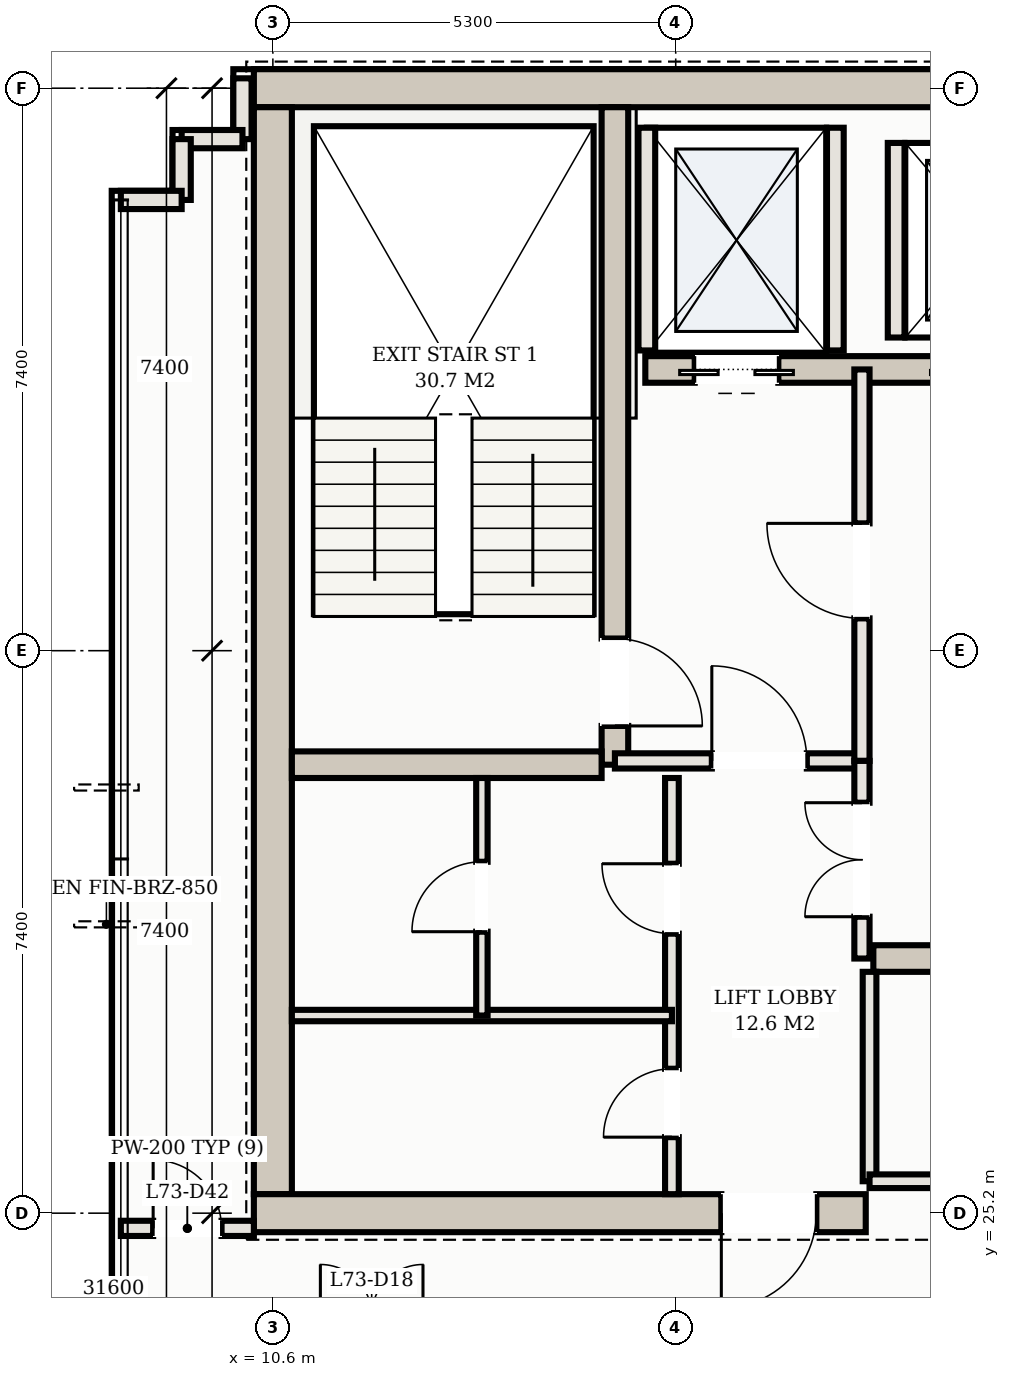
"""IFC4 building model, lengths in metres.
Left out: names, types, materials, properties, quantities, classifications, styles, units other than length and angle.
Written with IfcOpenShell. Run it as: python <this file> out.ifc"""

import sys

from ifc_helpers import new_model, si_unit, direction, frame, frame_2d, origin, place, context, subcontext, project, spatial, rectangle, extrude, element, fill, save


model = new_model("IFC4")
c1 = context("Model", 3, precision=1e-05, world=origin(), true_north=direction((0.0, 1.0)))
c2 = subcontext(c1, "Body", "Model", "MODEL_VIEW")
j1 = project(units=[si_unit("LENGTHUNIT", "METRE"), si_unit("PLANEANGLEUNIT", "RADIAN")], contexts=[c1])
p1 = place(None, origin())
s1 = spatial("IfcSite", under=j1, at=p1, CompositionType="ELEMENT")
p2 = place(p1, origin())
s2 = spatial("IfcBuilding", under=s1, at=p2, CompositionType="ELEMENT")
p3 = place(p2, frame((0.0, 0.0, 262.7)))
s3 = spatial("IfcBuildingStorey", under=s2, at=p3, CompositionType="ELEMENT", Elevation=262.7)
p4 = place(p3, frame((10.35, 40.0, 0.0), z_axis=(0.0, 0.0, 1.0), x_axis=(1.0, 0.0, 0.0)))
e1 = element("IfcWall", 1, at=p4, inside=s3, PredefinedType="SHEAR", context=c2, shape_type="SweptSolid", body=[
    extrude(rectangle(XDim=32.3, YDim=0.5, at=frame_2d((16.15, 0.0))), origin(), (0.0, 0.0, 1.0), 3.04),
])
p5 = place(p3, frame((10.6, 25.45, 0.0), z_axis=(0.0, 0.0, 1.0), x_axis=(0.0, 1.0, 0.0)))
e2 = element("IfcWall", 2, at=p5, inside=s3, PredefinedType="SHEAR", context=c2, shape_type="SweptSolid", body=[
    extrude(rectangle(XDim=14.3, YDim=0.5, at=frame_2d((7.15, 0.0))), origin(), (0.0, 0.0, 1.0), 3.04),
])
p6 = place(p3, frame((10.35, 25.2, 0.0), z_axis=(0.0, 0.0, 1.0), x_axis=(1.0, 0.0, 0.0)))
e3 = element("IfcWall", 3, at=p6, inside=s3, PredefinedType="SHEAR", context=c2, shape_type="SweptSolid", body=[
    extrude(rectangle(XDim=8.05, YDim=0.5, at=frame_2d((4.025, 0.0))), origin(), (0.0, 0.0, 1.0), 3.04),
])
p7 = place(p6, frame((6.15, 0.0, 0.0)))
e4 = element("IfcOpeningElement", 4, at=p7, cuts=e3, PredefinedType="OPENING", context=c2, shape_type="SweptSolid", body=[
    extrude(rectangle(XDim=1.25, YDim=2.2, at=frame_2d((0.625, 1.1))), frame((0.0, 0.26, 0.0), z_axis=(0.0, -1.0, 0.0), x_axis=(1.0, 0.0, 0.0)), (0.0, 0.0, 1.0), 0.52),
])
p8 = place(p3, frame((15.1, 31.1, 0.0), z_axis=(0.0, 0.0, 1.0), x_axis=(0.0, 1.0, 0.0)))
e5 = element("IfcWall", 5, at=p8, inside=s3, PredefinedType="SHEAR", context=c2, shape_type="SweptSolid", body=[
    extrude(rectangle(XDim=8.65, YDim=0.35, at=frame_2d((4.325, 0.0))), origin(), (0.0, 0.0, 1.0), 3.04),
])
p9 = place(p8, frame((0.51, 0.0, 0.0)))
e6 = element("IfcOpeningElement", 6, at=p9, cuts=e5, PredefinedType="OPENING", context=c2, shape_type="SweptSolid", body=[
    extrude(rectangle(XDim=1.15, YDim=2.2, at=frame_2d((0.575, 1.1))), frame((0.0, 0.185, 0.0), z_axis=(0.0, -1.0, 0.0), x_axis=(1.0, 0.0, 0.0)), (0.0, 0.0, 1.0), 0.37),
])
p10 = place(p3, frame((10.85, 31.1, 0.0), z_axis=(0.0, 0.0, 1.0), x_axis=(1.0, 0.0, 0.0)))
e7 = element("IfcWall", 7, at=p10, inside=s3, PredefinedType="SHEAR", context=c2, shape_type="SweptSolid", body=[
    extrude(rectangle(XDim=4.075, YDim=0.35, at=frame_2d((2.038, 0.0))), origin(), (0.0, 0.0, 1.0), 3.04),
])
p11 = place(p3, frame((15.5, 36.3, 0.0), z_axis=(0.0, 0.0, 1.0), x_axis=(1.0, 0.0, 0.0)))
e8 = element("IfcWall", 8, at=p11, inside=s3, PredefinedType="SHEAR", context=c2, shape_type="SweptSolid", body=[
    extrude(rectangle(XDim=22.0, YDim=0.35, at=frame_2d((11.0, 0.0))), origin(), (0.0, 0.0, 1.0), 3.04),
])
p12 = place(p11, frame((0.65, 0.0, 0.0)))
e9 = element("IfcOpeningElement", 9, at=p12, cuts=e8, PredefinedType="OPENING", context=c2, shape_type="SweptSolid", body=[
    extrude(rectangle(XDim=1.1, YDim=2.15, at=frame_2d((0.55, 1.075))), frame((0.0, 0.185, 0.0), z_axis=(0.0, -1.0, 0.0), x_axis=(1.0, 0.0, 0.0)), (0.0, 0.0, 1.0), 0.37),
])
p13 = place(p11, frame((20.25, 0.0, 0.0)))
e10 = element("IfcOpeningElement", 10, at=p13, cuts=e8, PredefinedType="OPENING", context=c2, shape_type="SweptSolid", body=[
    extrude(rectangle(XDim=1.1, YDim=2.15, at=frame_2d((0.55, 1.075))), frame((0.0, 0.185, 0.0), z_axis=(0.0, -1.0, 0.0), x_axis=(1.0, 0.0, 0.0)), (0.0, 0.0, 1.0), 0.37),
])
p14 = place(p11, frame((17.05, 0.0, 0.0)))
e11 = element("IfcOpeningElement", 11, at=p14, cuts=e8, PredefinedType="OPENING", context=c2, shape_type="SweptSolid", body=[
    extrude(rectangle(XDim=1.3, YDim=2.2, at=frame_2d((0.65, 1.1))), frame((0.0, 0.185, 0.0), z_axis=(0.0, -1.0, 0.0), x_axis=(1.0, 0.0, 0.0)), (0.0, 0.0, 1.0), 0.37),
])
p15 = place(p11, frame((3.95, 0.0, 0.0)))
e12 = element("IfcOpeningElement", 12, at=p15, cuts=e8, PredefinedType="OPENING", context=c2, shape_type="SweptSolid", body=[
    extrude(rectangle(XDim=1.1, YDim=2.15, at=frame_2d((0.55, 1.075))), frame((0.0, 0.185, 0.0), z_axis=(0.0, -1.0, 0.0), x_axis=(1.0, 0.0, 0.0)), (0.0, 0.0, 1.0), 0.37),
])
p16 = place(p11, frame((6.55, 0.0, 0.0)))
e13 = element("IfcOpeningElement", 13, at=p16, cuts=e8, PredefinedType="OPENING", context=c2, shape_type="SweptSolid", body=[
    extrude(rectangle(XDim=1.1, YDim=2.15, at=frame_2d((0.55, 1.075))), frame((0.0, 0.185, 0.0), z_axis=(0.0, -1.0, 0.0), x_axis=(1.0, 0.0, 0.0)), (0.0, 0.0, 1.0), 0.37),
])
p17 = place(p11, frame((9.15, 0.0, 0.0)))
e14 = element("IfcOpeningElement", 14, at=p17, cuts=e8, PredefinedType="OPENING", context=c2, shape_type="SweptSolid", body=[
    extrude(rectangle(XDim=1.1, YDim=2.15, at=frame_2d((0.55, 1.075))), frame((0.0, 0.185, 0.0), z_axis=(0.0, -1.0, 0.0), x_axis=(1.0, 0.0, 0.0)), (0.0, 0.0, 1.0), 0.37),
])
p18 = place(p3, frame((18.5, 28.55, 0.0), z_axis=(0.0, 0.0, 1.0), x_axis=(1.0, 0.0, 0.0)))
e15 = element("IfcWall", 15, at=p18, inside=s3, PredefinedType="SHEAR", context=c2, shape_type="SweptSolid", body=[
    extrude(rectangle(XDim=16.0, YDim=0.35, at=frame_2d((8.0, 0.0))), origin(), (0.0, 0.0, 1.0), 3.04),
])
for number, where, z_axis, x_axis in (
    (16, (15.52, 36.55, 0.0), (0.0, 0.0, 1.0), (0.0, 1.0, 0.0)),
    (17, (18.0, 36.55, 0.0), (0.0, 0.0, 1.0), (0.0, 1.0, 0.0)),
):
    element("IfcWall", number, at=place(p3, frame(where, z_axis=z_axis, x_axis=x_axis)), inside=s3, PredefinedType="SOLIDWALL", context=c2, shape_type="SweptSolid", body=[
        extrude(rectangle(XDim=2.93, YDim=0.22, at=frame_2d((1.465, 0.0))), origin(), (0.0, 0.0, 1.0), 3.04),
    ])
p19 = place(p3, frame((18.8, 36.72, 0.0), z_axis=(0.0, 0.0, 1.0), x_axis=(0.0, 1.0, 0.0)))
e18 = element("IfcWall", 18, at=p19, inside=s3, PredefinedType="SOLIDWALL", context=c2, shape_type="SweptSolid", body=[
    extrude(rectangle(XDim=2.56, YDim=0.22, at=frame_2d((1.28, 0.0))), origin(), (0.0, 0.0, 1.0), 3.04),
])
p20 = place(p3, frame((10.2, 40.13, 0.0), z_axis=(0.0, 0.0, 1.0), x_axis=(0.0, -1.0, 0.0)))
e19 = element("IfcWall", 19, at=p20, inside=s3, PredefinedType="SOLIDWALL", context=c2, shape_type="SweptSolid", body=[
    extrude(rectangle(XDim=0.8, YDim=0.24, at=frame_2d((0.4, 0.0))), origin(), (0.0, 0.0, 1.0), 3.04),
])
for number, where, z_axis, x_axis in (
    (20, (10.2, 39.33, 0.0), (0.0, 0.0, 1.0), (-1.0, 0.0, 0.0)),
    (21, (9.4, 39.33, 0.0), (0.0, 0.0, 1.0), (0.0, -1.0, 0.0)),
):
    element("IfcWall", number, at=place(p3, frame(where, z_axis=z_axis, x_axis=x_axis)), inside=s3, PredefinedType="SOLIDWALL", context=c2, shape_type="SweptSolid", body=[
        extrude(rectangle(XDim=0.8, YDim=0.24, at=frame_2d((0.4, 0.0))), origin(), (0.0, 0.0, 1.0), 3.04),
    ])
p21 = place(p3, frame((9.4, 38.53, 0.0), z_axis=(0.0, 0.0, 1.0), x_axis=(-1.0, 0.0, 0.0)))
e22 = element("IfcWall", 22, at=p21, inside=s3, PredefinedType="SOLIDWALL", context=c2, shape_type="SweptSolid", body=[
    extrude(rectangle(XDim=0.8, YDim=0.24, at=frame_2d((0.4, 0.0))), origin(), (0.0, 0.0, 1.0), 3.04),
])
p22 = place(p3, frame((15.1, 31.15, 0.0), z_axis=(0.0, 0.0, 1.0), x_axis=(1.0, 0.0, 0.0)))
e23 = element("IfcWall", 23, at=p22, inside=s3, PredefinedType="PARTITIONING", context=c2, shape_type="SweptSolid", body=[
    extrude(rectangle(XDim=3.25, YDim=0.2, at=frame_2d((1.625, 0.0))), origin(), (0.0, 0.0, 1.0), 2.38),
])
p23 = place(p22, frame((1.275, 0.0, 0.0)))
e24 = element("IfcOpeningElement", 24, at=p23, cuts=e23, PredefinedType="OPENING", context=c2, shape_type="SweptSolid", body=[
    extrude(rectangle(XDim=1.25, YDim=2.2, at=frame_2d((0.625, 1.1))), frame((0.0, 0.11, 0.0), z_axis=(0.0, -1.0, 0.0), x_axis=(1.0, 0.0, 0.0)), (0.0, 0.0, 1.0), 0.22),
])
p24 = place(p3, frame((18.35, 31.15, 0.0), z_axis=(0.0, 0.0, 1.0), x_axis=(0.0, 1.0, 0.0)))
e25 = element("IfcWall", 25, at=p24, inside=s3, PredefinedType="PARTITIONING", context=c2, shape_type="SweptSolid", body=[
    extrude(rectangle(XDim=5.15, YDim=0.2, at=frame_2d((2.575, 0.0))), origin(), (0.0, 0.0, 1.0), 2.38),
])
p25 = place(p24, frame((1.875, 0.0, 0.0)))
e26 = element("IfcOpeningElement", 26, at=p25, cuts=e25, PredefinedType="OPENING", context=c2, shape_type="SweptSolid", body=[
    extrude(rectangle(XDim=1.25, YDim=2.2, at=frame_2d((0.625, 1.1))), frame((0.0, 0.11, 0.0), z_axis=(0.0, -1.0, 0.0), x_axis=(1.0, 0.0, 0.0)), (0.0, 0.0, 1.0), 0.22),
])
p26 = place(p3, frame((15.85, 25.45, 0.0), z_axis=(0.0, 0.0, 1.0), x_axis=(0.0, 1.0, 0.0)))
e27 = element("IfcWall", 27, at=p26, inside=s3, PredefinedType="PARTITIONING", context=c2, shape_type="SweptSolid", body=[
    extrude(rectangle(XDim=5.475, YDim=0.18, at=frame_2d((2.738, 0.0))), origin(), (0.0, 0.0, 1.0), 2.38),
])
p27 = place(p26, frame((0.75, 0.0, 0.0)))
e28 = element("IfcOpeningElement", 28, at=p27, cuts=e27, PredefinedType="OPENING", context=c2, shape_type="SweptSolid", body=[
    extrude(rectangle(XDim=0.9, YDim=2.15, at=frame_2d((0.45, 1.075))), frame((0.0, 0.1, 0.0), z_axis=(0.0, -1.0, 0.0), x_axis=(1.0, 0.0, 0.0)), (0.0, 0.0, 1.0), 0.2),
])
p28 = place(p26, frame((3.427, 0.0, 0.0)))
e29 = element("IfcOpeningElement", 29, at=p28, cuts=e27, PredefinedType="OPENING", context=c2, shape_type="SweptSolid", body=[
    extrude(rectangle(XDim=0.92, YDim=2.15, at=frame_2d((0.46, 1.075))), frame((0.0, 0.1, 0.0), z_axis=(0.0, -1.0, 0.0), x_axis=(1.0, 0.0, 0.0)), (0.0, 0.0, 1.0), 0.2),
])
p29 = place(p3, frame((10.85, 27.8, 0.0), z_axis=(0.0, 0.0, 1.0), x_axis=(1.0, 0.0, 0.0)))
e30 = element("IfcWall", 30, at=p29, inside=s3, PredefinedType="PARTITIONING", context=c2, shape_type="SweptSolid", body=[
    extrude(rectangle(XDim=5.0, YDim=0.15, at=frame_2d((2.5, 0.0))), origin(), (0.0, 0.0, 1.0), 2.38),
])
p30 = place(p3, frame((13.35, 27.8, 0.0), z_axis=(0.0, 0.0, 1.0), x_axis=(0.0, 1.0, 0.0)))
e31 = element("IfcWall", 31, at=p30, inside=s3, PredefinedType="PARTITIONING", context=c2, shape_type="SweptSolid", body=[
    extrude(rectangle(XDim=3.125, YDim=0.15, at=frame_2d((1.562, 0.0))), origin(), (0.0, 0.0, 1.0), 2.38),
])
p31 = place(p30, frame((1.103, 0.0, 0.0)))
e32 = element("IfcOpeningElement", 32, at=p31, cuts=e31, PredefinedType="OPENING", context=c2, shape_type="SweptSolid", body=[
    extrude(rectangle(XDim=0.92, YDim=2.15, at=frame_2d((0.46, 1.075))), frame((0.0, 0.085, 0.0), z_axis=(0.0, -1.0, 0.0), x_axis=(1.0, 0.0, 0.0)), (0.0, 0.0, 1.0), 0.17),
])
p32 = place(p3, frame((18.35, 28.55, 0.0), z_axis=(0.0, 0.0, 1.0), x_axis=(0.0, 1.0, 0.0)))
e33 = element("IfcWall", 33, at=p32, inside=s3, PredefinedType="PARTITIONING", context=c2, shape_type="SweptSolid", body=[
    extrude(rectangle(XDim=2.6, YDim=0.2, at=frame_2d((1.3, 0.0))), origin(), (0.0, 0.0, 1.0), 2.38),
])
p33 = place(p32, frame((0.55, 0.0, 0.0)))
e34 = element("IfcOpeningElement", 34, at=p33, cuts=e33, PredefinedType="OPENING", context=c2, shape_type="SweptSolid", body=[
    extrude(rectangle(XDim=1.5, YDim=2.25, at=frame_2d((0.75, 1.125))), frame((0.0, 0.11, 0.0), z_axis=(0.0, -1.0, 0.0), x_axis=(1.0, 0.0, 0.0)), (0.0, 0.0, 1.0), 0.22),
])
p34 = place(p3, frame((18.45, 25.62, 0.0), z_axis=(0.0, 0.0, 1.0), x_axis=(0.0, 1.0, 0.0)))
e35 = element("IfcWall", 35, at=p34, inside=s3, PredefinedType="PARTITIONING", context=c2, shape_type="SweptSolid", body=[
    extrude(rectangle(XDim=2.755, YDim=0.18, at=frame_2d((1.377, 0.0))), origin(), (0.0, 0.0, 1.0), 2.38),
])
p35 = place(p3, frame((18.45, 25.62, 0.0), z_axis=(0.0, 0.0, 1.0), x_axis=(1.0, 0.0, 0.0)))
e36 = element("IfcWall", 36, at=p35, inside=s3, PredefinedType="PARTITIONING", context=c2, shape_type="SweptSolid", body=[
    extrude(rectangle(XDim=7.9, YDim=0.18, at=frame_2d((3.95, 0.0))), origin(), (0.0, 0.0, 1.0), 2.38),
])
p36 = place(p35, frame((3.34, 0.0, 0.0)))
e37 = element("IfcOpeningElement", 37, at=p36, cuts=e36, PredefinedType="OPENING", context=c2, shape_type="SweptSolid", body=[
    extrude(rectangle(XDim=0.92, YDim=2.15, at=frame_2d((0.46, 1.075))), frame((0.0, 0.1, 0.0), z_axis=(0.0, -1.0, 0.0), x_axis=(1.0, 0.0, 0.0)), (0.0, 0.0, 1.0), 0.2),
])
p37 = place(p3, frame((8.6, 25.0, 0.0), z_axis=(0.0, 0.0, 1.0), x_axis=(1.0, 0.0, 0.0)))
e38 = element("IfcWall", 38, at=p37, inside=s3, PredefinedType="PARTITIONING", context=c2, shape_type="SweptSolid", body=[
    extrude(rectangle(XDim=1.75, YDim=0.2, at=frame_2d((0.875, 0.0))), origin(), (0.0, 0.0, 1.0), 2.38),
])
p38 = place(p37, frame((0.425, 0.0, 0.0)))
e39 = element("IfcOpeningElement", 39, at=p38, cuts=e38, PredefinedType="OPENING", context=c2, shape_type="SweptSolid", body=[
    extrude(rectangle(XDim=0.9, YDim=2.15, at=frame_2d((0.45, 1.075))), frame((0.0, 0.11, 0.0), z_axis=(0.0, -1.0, 0.0), x_axis=(1.0, 0.0, 0.0)), (0.0, 0.0, 1.0), 0.22),
])
p39 = place(p12, frame((1.1, 0.0, 0.0), z_axis=(0.0, 0.0, 1.0), x_axis=(-1.0, 0.0, 0.0)))
e40 = element("IfcDoor", 40, at=p39, inside=s3, OperationType="DOUBLE_DOOR_SLIDING", PredefinedType="DOOR", context=c2, shape_type="SweptSolid", body=[
    extrude(rectangle(XDim=1.1, YDim=2.15, at=frame_2d((0.55, 1.075))), frame((0.0, 0.025, 0.0), z_axis=(0.0, -1.0, 0.0), x_axis=(1.0, 0.0, 0.0)), (0.0, 0.0, 1.0), 0.05),
])
fill(e9, e40)
p40 = place(p7, frame((1.25, 0.0, 0.0), z_axis=(0.0, 0.0, 1.0), x_axis=(-1.0, 0.0, 0.0)))
e41 = element("IfcDoor", 41, at=p40, inside=s3, OperationType="SINGLE_SWING_RIGHT", PredefinedType="DOOR", context=c2, shape_type="SweptSolid", body=[
    extrude(rectangle(XDim=1.25, YDim=2.2, at=frame_2d((0.625, 1.1))), frame((0.0, 0.025, 0.0), z_axis=(0.0, -1.0, 0.0), x_axis=(1.0, 0.0, 0.0)), (0.0, 0.0, 1.0), 0.05),
])
fill(e4, e41)
p41 = place(p23, origin())
e42 = element("IfcDoor", 42, at=p41, inside=s3, OperationType="SINGLE_SWING_LEFT", PredefinedType="DOOR", context=c2, shape_type="SweptSolid", body=[
    extrude(rectangle(XDim=1.25, YDim=2.2, at=frame_2d((0.625, 1.1))), frame((0.0, 0.025, 0.0), z_axis=(0.0, -1.0, 0.0), x_axis=(1.0, 0.0, 0.0)), (0.0, 0.0, 1.0), 0.05),
])
fill(e24, e42)
p42 = place(p25, origin())
e43 = element("IfcDoor", 43, at=p42, inside=s3, OperationType="SINGLE_SWING_RIGHT", PredefinedType="DOOR", context=c2, shape_type="SweptSolid", body=[
    extrude(rectangle(XDim=1.25, YDim=2.2, at=frame_2d((0.625, 1.1))), frame((0.0, 0.025, 0.0), z_axis=(0.0, -1.0, 0.0), x_axis=(1.0, 0.0, 0.0)), (0.0, 0.0, 1.0), 0.05),
])
fill(e26, e43)
p43 = place(p9, frame((1.15, 0.0, 0.0), z_axis=(0.0, 0.0, 1.0), x_axis=(-1.0, 0.0, 0.0)))
e44 = element("IfcDoor", 44, at=p43, inside=s3, OperationType="SINGLE_SWING_RIGHT", PredefinedType="DOOR", context=c2, shape_type="SweptSolid", body=[
    extrude(rectangle(XDim=1.15, YDim=2.2, at=frame_2d((0.575, 1.1))), frame((0.0, 0.025, 0.0), z_axis=(0.0, -1.0, 0.0), x_axis=(1.0, 0.0, 0.0)), (0.0, 0.0, 1.0), 0.05),
])
fill(e6, e44)
p44 = place(p27, origin())
e45 = element("IfcDoor", 45, at=p44, inside=s3, OperationType="SINGLE_SWING_LEFT", PredefinedType="DOOR", context=c2, shape_type="SweptSolid", body=[
    extrude(rectangle(XDim=0.9, YDim=2.15, at=frame_2d((0.45, 1.075))), frame((0.0, 0.025, 0.0), z_axis=(0.0, -1.0, 0.0), x_axis=(1.0, 0.0, 0.0)), (0.0, 0.0, 1.0), 0.05),
])
fill(e28, e45)
p45 = place(p28, origin())
e46 = element("IfcDoor", 46, at=p45, inside=s3, OperationType="SINGLE_SWING_RIGHT", PredefinedType="DOOR", context=c2, shape_type="SweptSolid", body=[
    extrude(rectangle(XDim=0.92, YDim=2.15, at=frame_2d((0.46, 1.075))), frame((0.0, 0.025, 0.0), z_axis=(0.0, -1.0, 0.0), x_axis=(1.0, 0.0, 0.0)), (0.0, 0.0, 1.0), 0.05),
])
fill(e29, e46)
p46 = place(p31, origin())
e47 = element("IfcDoor", 47, at=p46, inside=s3, OperationType="SINGLE_SWING_LEFT", PredefinedType="DOOR", context=c2, shape_type="SweptSolid", body=[
    extrude(rectangle(XDim=0.92, YDim=2.15, at=frame_2d((0.46, 1.075))), frame((0.0, 0.025, 0.0), z_axis=(0.0, -1.0, 0.0), x_axis=(1.0, 0.0, 0.0)), (0.0, 0.0, 1.0), 0.05),
])
fill(e32, e47)
p47 = place(p33, origin())
e48 = element("IfcDoor", 48, at=p47, inside=s3, OperationType="DOUBLE_DOOR_SINGLE_SWING", PredefinedType="DOOR", context=c2, shape_type="SweptSolid", body=[
    extrude(rectangle(XDim=1.5, YDim=2.25, at=frame_2d((0.75, 1.125))), frame((0.0, 0.025, 0.0), z_axis=(0.0, -1.0, 0.0), x_axis=(1.0, 0.0, 0.0)), (0.0, 0.0, 1.0), 0.05),
])
fill(e34, e48)
p48 = place(p38, origin())
e49 = element("IfcDoor", 49, at=p48, inside=s3, OperationType="SINGLE_SWING_LEFT", PredefinedType="DOOR", context=c2, shape_type="SweptSolid", body=[
    extrude(rectangle(XDim=0.9, YDim=2.15, at=frame_2d((0.45, 1.075))), frame((0.0, 0.025, 0.0), z_axis=(0.0, -1.0, 0.0), x_axis=(1.0, 0.0, 0.0)), (0.0, 0.0, 1.0), 0.05),
])
fill(e39, e49)
save(model, sys.argv[1])
